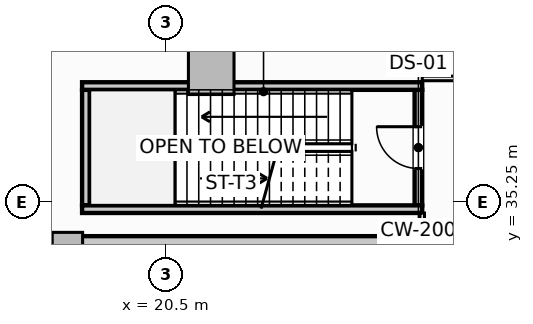
"""IFC4 building model, lengths in metres.
Left out: names, types, materials, properties, quantities, classifications, styles, units other than length and angle.
Written with IfcOpenShell. Run it as: python <this file> out.ifc"""

import sys

from ifc_helpers import new_model, si_unit, direction, frame, frame_2d, origin, origin_2d, place, context, subcontext, project, spatial, rectangle, extrude, element, fill, save


model = new_model("IFC4")
c1 = context("Model", 3, precision=1e-05, world=origin(), true_north=direction((0.0, 1.0)))
c2 = subcontext(c1, "Body", "Model", "MODEL_VIEW")
j1 = project(units=[si_unit("LENGTHUNIT", "METRE"), si_unit("PLANEANGLEUNIT", "RADIAN")], contexts=[c1])
p1 = place(None, origin())
s1 = spatial("IfcSite", under=j1, at=p1, CompositionType="ELEMENT")
p2 = place(p1, origin())
s2 = spatial("IfcBuilding", under=s1, at=p2, CompositionType="ELEMENT")
p3 = place(p2, frame((0.0, 0.0, 21.0)))
s3 = spatial("IfcBuildingStorey", under=s2, at=p3, CompositionType="ELEMENT", Elevation=21.0)
p4 = place(p3, frame((14.075, 33.925, -0.24), z_axis=(0.0, 0.0, 1.0), x_axis=(1.0, 0.0, 0.0)))
e1 = element("IfcWall", 1, at=p4, inside=s3, PredefinedType="SHEAR", context=c2, shape_type="SweptSolid", body=[
    extrude(rectangle(XDim=13.85, YDim=0.85, at=frame_2d((6.925, 0.0))), origin(), (0.0, 0.0, 1.0), 5.46),
])
p5 = place(p3, frame((21.698, 38.677, -0.24), z_axis=(0.0, 0.0, 1.0), x_axis=(1.0, 0.0, 0.0)))
e2 = element("IfcColumn", 2, at=p5, inside=s3, PredefinedType="COLUMN", context=c2, shape_type="SweptSolid", body=[
    extrude(rectangle(XDim=1.2, YDim=1.2, at=origin_2d()), origin(), (0.0, 0.0, 1.0), 5.46),
])
p6 = place(p3, frame((17.914, 34.05, -0.24), z_axis=(0.0, 0.0, 1.0), x_axis=(1.0, 0.0, 0.0)))
e3 = element("IfcColumn", 3, at=p6, inside=s3, PredefinedType="PILASTER", context=c2, shape_type="SweptSolid", body=[
    extrude(rectangle(XDim=0.8, YDim=0.8, at=origin_2d()), origin(), (0.0, 0.0, 1.0), 5.46),
])
p7 = place(p3, frame((27.15, 35.16, -0.24), z_axis=(0.0, 0.0, 1.0), x_axis=(0.0, 1.0, 0.0)))
e4 = element("IfcWall", 4, at=p7, inside=s3, PredefinedType="SHEAR", context=c2, shape_type="SweptSolid", body=[
    extrude(rectangle(XDim=3.04, YDim=0.2, at=frame_2d((1.52, 0.0))), origin(), (0.0, 0.0, 1.0), 5.46),
])
p8 = place(p7, frame((0.97, 0.0, 0.24)))
e5 = element("IfcOpeningElement", 5, at=p8, cuts=e4, PredefinedType="OPENING", context=c2, shape_type="SweptSolid", body=[
    extrude(rectangle(XDim=1.1, YDim=2.15, at=frame_2d((0.55, 1.075))), frame((0.0, 0.11, 0.0), z_axis=(0.0, -1.0, 0.0), x_axis=(1.0, 0.0, 0.0)), (0.0, 0.0, 1.0), 0.22),
])
p9 = place(p3, frame((18.4, 35.16, -0.24), z_axis=(0.0, 0.0, 1.0), x_axis=(0.0, 1.0, 0.0)))
e6 = element("IfcWall", 6, at=p9, inside=s3, PredefinedType="SHEAR", context=c2, shape_type="SweptSolid", body=[
    extrude(rectangle(XDim=3.04, YDim=0.2, at=frame_2d((1.52, 0.0))), origin(), (0.0, 0.0, 1.0), 5.46),
])
for number, where, z_axis, x_axis in (
    (7, (18.3, 38.3, -0.24), (0.0, 0.0, 1.0), (1.0, 0.0, 0.0)),
    (8, (18.3, 35.06, -0.24), (0.0, 0.0, 1.0), (1.0, 0.0, 0.0)),
):
    element("IfcWall", number, at=place(p3, frame(where, z_axis=z_axis, x_axis=x_axis)), inside=s3, PredefinedType="SHEAR", context=c2, shape_type="SweptSolid", body=[
        extrude(rectangle(XDim=8.95, YDim=0.2, at=frame_2d((4.475, 0.0))), origin(), (0.0, 0.0, 1.0), 5.46),
    ])
p10 = place(p3, frame((27.25, 34.352, 0.0), z_axis=(0.0, 0.0, 1.0), x_axis=(0.0, 1.0, 0.0)))
e9 = element("IfcWall", 9, at=p10, inside=s3, PredefinedType="PARTITIONING", context=c2, shape_type="SweptSolid", body=[
    extrude(rectangle(XDim=0.606, YDim=0.12, at=frame_2d((0.303, 0.0))), origin(), (0.0, 0.0, 1.0), 5.22),
])
p11 = place(p3, frame((27.25, 38.5, 0.0), z_axis=(0.0, 0.0, 1.0), x_axis=(1.0, 0.0, 0.0)))
e10 = element("IfcWall", 10, at=p11, inside=s3, PredefinedType="PARTITIONING", context=c2, shape_type="SweptSolid", body=[
    extrude(rectangle(XDim=2.468, YDim=0.12, at=frame_2d((1.234, 0.0))), origin(), (0.0, 0.0, 1.0), 5.22),
])
p12 = place(p8, origin())
e11 = element("IfcDoor", 11, at=p12, inside=s3, OperationType="SINGLE_SWING_RIGHT", PredefinedType="DOOR", context=c2, shape_type="SweptSolid", body=[
    extrude(rectangle(XDim=1.1, YDim=2.15, at=frame_2d((0.55, 1.075))), frame((0.0, 0.025, 0.0), z_axis=(0.0, -1.0, 0.0), x_axis=(1.0, 0.0, 0.0)), (0.0, 0.0, 1.0), 0.05),
])
fill(e5, e11)
save(model, sys.argv[1])
